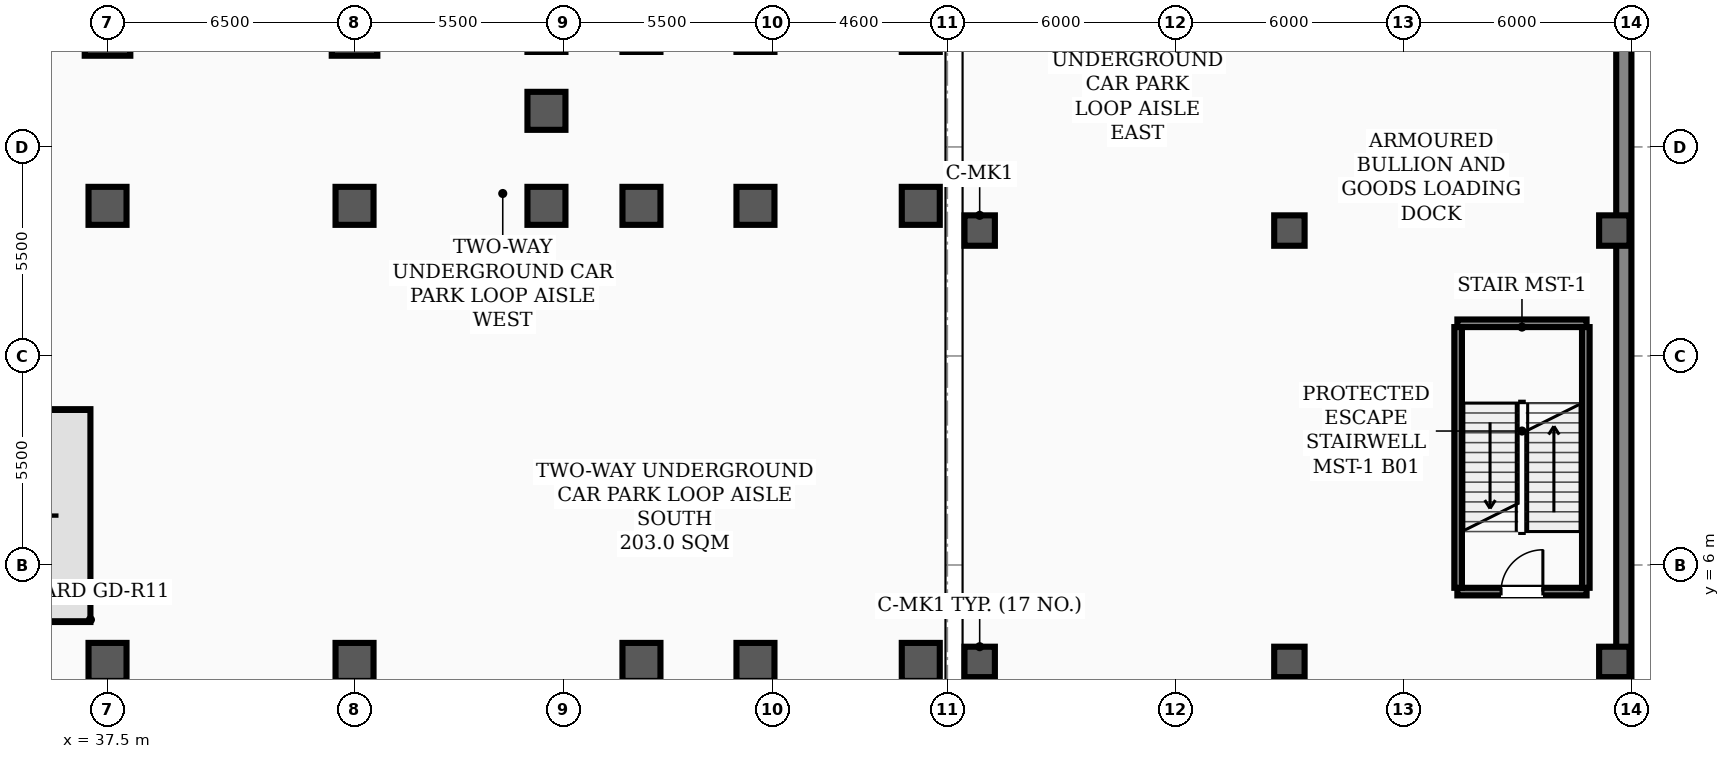
"""IFC4 building model, lengths in metres.
Left out: names, types, materials, properties, quantities, classifications, styles, units other than length and angle.
Written with IfcOpenShell. Run it as: python <this file> out.ifc"""

import sys

from ifc_helpers import new_model, si_unit, direction, frame, frame_2d, origin, origin_2d, place, context, subcontext, project, spatial, rectangle, hollow_rectangle, extrude, element, fill, save


model = new_model("IFC4")
c1 = context("Model", 3, precision=1e-05, world=origin(), true_north=direction((0.0, 1.0)))
c2 = subcontext(c1, "Body", "Model", "MODEL_VIEW")
j1 = project(units=[si_unit("LENGTHUNIT", "METRE"), si_unit("PLANEANGLEUNIT", "RADIAN")], contexts=[c1])
p1 = place(None, origin())
s1 = spatial("IfcSite", under=j1, at=p1, CompositionType="ELEMENT")
p2 = place(p1, origin())
s2 = spatial("IfcBuilding", under=s1, at=p2, CompositionType="ELEMENT")
p3 = place(p2, frame((0.0, 0.0, -5.0)))
s3 = spatial("IfcBuildingStorey", under=s2, at=p3, CompositionType="ELEMENT", Elevation=-5.0)
for number, where, z_axis, x_axis in (
    (1, (37.5, 20.0, 0.0), (0.0, 0.0, 1.0), (1.0, 0.0, 0.0)),
    (2, (44.0, 20.0, 0.0), (0.0, 0.0, 1.0), (1.0, 0.0, 0.0)),
):
    element("IfcColumn", number, at=place(p3, frame(where, z_axis=z_axis, x_axis=x_axis)), inside=s3, PredefinedType="COLUMN", context=c2, shape_type="SweptSolid", body=[
        extrude(hollow_rectangle(XDim=1.2, YDim=1.2, WallThickness=0.04, InnerFilletRadius=0.02, OuterFilletRadius=0.06, at=origin_2d()), origin(), (0.0, 0.0, 1.0), 5.0),
    ])
for number, where, z_axis, x_axis in (
    (3, (37.5, 3.45, 0.0), (0.0, 0.0, 1.0), (1.0, 0.0, 0.0)),
    (4, (37.5, 15.45, 0.0), (0.0, 0.0, 1.0), (1.0, 0.0, 0.0)),
    (5, (44.0, 3.45, 0.0), (0.0, 0.0, 1.0), (1.0, 0.0, 0.0)),
    (6, (44.0, 15.45, 0.0), (0.0, 0.0, 1.0), (1.0, 0.0, 0.0)),
    (7, (49.05, 15.45, 0.0), (0.0, 0.0, 1.0), (1.0, 0.0, 0.0)),
    (8, (49.05, 17.95, 0.0), (0.0, 0.0, 1.0), (1.0, 0.0, 0.0)),
    (9, (51.55, 3.45, 0.0), (0.0, 0.0, 1.0), (1.0, 0.0, 0.0)),
    (10, (51.55, 15.45, 0.0), (0.0, 0.0, 1.0), (1.0, 0.0, 0.0)),
    (11, (54.55, 3.45, 0.0), (0.0, 0.0, 1.0), (1.0, 0.0, 0.0)),
    (12, (54.55, 15.45, 0.0), (0.0, 0.0, 1.0), (1.0, 0.0, 0.0)),
    (13, (58.9, 3.45, 0.0), (0.0, 0.0, 1.0), (1.0, 0.0, 0.0)),
    (14, (58.9, 15.45, 0.0), (0.0, 0.0, 1.0), (1.0, 0.0, 0.0)),
):
    element("IfcColumn", number, at=place(p3, frame(where, z_axis=z_axis, x_axis=x_axis)), inside=s3, PredefinedType="COLUMN", context=c2, shape_type="SweptSolid", body=[
        extrude(rectangle(XDim=1.0, YDim=1.0, at=origin_2d()), origin(), (0.0, 0.0, 1.0), 5.0),
    ])
for number, where, z_axis, x_axis in (
    (15, (60.45, 3.45, 0.0), (0.0, 0.0, 1.0), (1.0, 0.0, 0.0)),
    (16, (60.45, 14.8, 0.0), (0.0, 0.0, 1.0), (1.0, 0.0, 0.0)),
    (17, (68.6, 3.45, 0.0), (0.0, 0.0, 1.0), (1.0, 0.0, 0.0)),
    (18, (68.6, 14.8, 0.0), (0.0, 0.0, 1.0), (1.0, 0.0, 0.0)),
    (19, (77.15, 3.45, 0.0), (0.0, 0.0, 1.0), (1.0, 0.0, 0.0)),
    (20, (77.15, 14.8, 0.0), (0.0, 0.0, 1.0), (1.0, 0.0, 0.0)),
):
    element("IfcColumn", number, at=place(p3, frame(where, z_axis=z_axis, x_axis=x_axis)), inside=s3, PredefinedType="COLUMN", context=c2, shape_type="SweptSolid", body=[
        extrude(rectangle(XDim=0.8, YDim=0.8, at=origin_2d()), origin(), (0.0, 0.0, 1.0), 5.0),
    ])
p4 = place(p3, frame((77.4, 0.2, 0.0), z_axis=(0.0, 0.0, 1.0), x_axis=(0.0, 1.0, 0.0)))
e21 = element("IfcWall", 21, at=p4, inside=s3, PredefinedType="SOLIDWALL", context=c2, shape_type="SweptSolid", body=[
    extrude(rectangle(XDim=51.2, YDim=0.4, at=frame_2d((25.6, 0.0))), origin(), (0.0, 0.0, 1.0), 4.75),
])
p5 = place(p3, frame((73.02, 5.3, 0.0), z_axis=(0.0, 0.0, 1.0), x_axis=(1.0, 0.0, 0.0)))
e22 = element("IfcWall", 22, at=p5, inside=s3, PredefinedType="STANDARD", context=c2, shape_type="SweptSolid", body=[
    extrude(rectangle(XDim=3.4, YDim=0.2, at=frame_2d((1.7, 0.0))), origin(), (0.0, 0.0, 1.0), 4.78),
])
p6 = place(p5, frame((1.15, 0.0, 0.0)))
e23 = element("IfcOpeningElement", 23, at=p6, cuts=e22, PredefinedType="OPENING", context=c2, shape_type="SweptSolid", body=[
    extrude(rectangle(XDim=1.1, YDim=2.08, at=frame_2d((0.55, 1.04))), frame((0.0, 0.11, 0.0), z_axis=(0.0, -1.0, 0.0), x_axis=(1.0, 0.0, 0.0)), (0.0, 0.0, 1.0), 0.22),
])
p7 = place(p3, frame((73.02, 12.36, 0.0), z_axis=(0.0, 0.0, 1.0), x_axis=(1.0, 0.0, 0.0)))
e24 = element("IfcWall", 24, at=p7, inside=s3, PredefinedType="STANDARD", context=c2, shape_type="SweptSolid", body=[
    extrude(rectangle(XDim=3.4, YDim=0.2, at=frame_2d((1.7, 0.0))), origin(), (0.0, 0.0, 1.0), 4.78),
])
for number, where, z_axis, x_axis in (
    (25, (73.04, 5.4, 0.0), (0.0, 0.0, 1.0), (0.0, 1.0, 0.0)),
    (26, (76.4, 5.4, 0.0), (0.0, 0.0, 1.0), (0.0, 1.0, 0.0)),
):
    element("IfcWall", number, at=place(p3, frame(where, z_axis=z_axis, x_axis=x_axis)), inside=s3, PredefinedType="STANDARD", context=c2, shape_type="SweptSolid", body=[
        extrude(rectangle(XDim=6.86, YDim=0.2, at=frame_2d((3.43, 0.0))), origin(), (0.0, 0.0, 1.0), 4.78),
    ])
p8 = place(p6, origin())
e27 = element("IfcDoor", 27, at=p8, inside=s3, OperationType="SINGLE_SWING_RIGHT", PredefinedType="DOOR", context=c2, shape_type="SweptSolid", body=[
    extrude(rectangle(XDim=1.1, YDim=2.08, at=frame_2d((0.55, 1.04))), frame((0.0, 0.025, 0.0), z_axis=(0.0, -1.0, 0.0), x_axis=(1.0, 0.0, 0.0)), (0.0, 0.0, 1.0), 0.05),
])
fill(e23, e27)
save(model, sys.argv[1])
